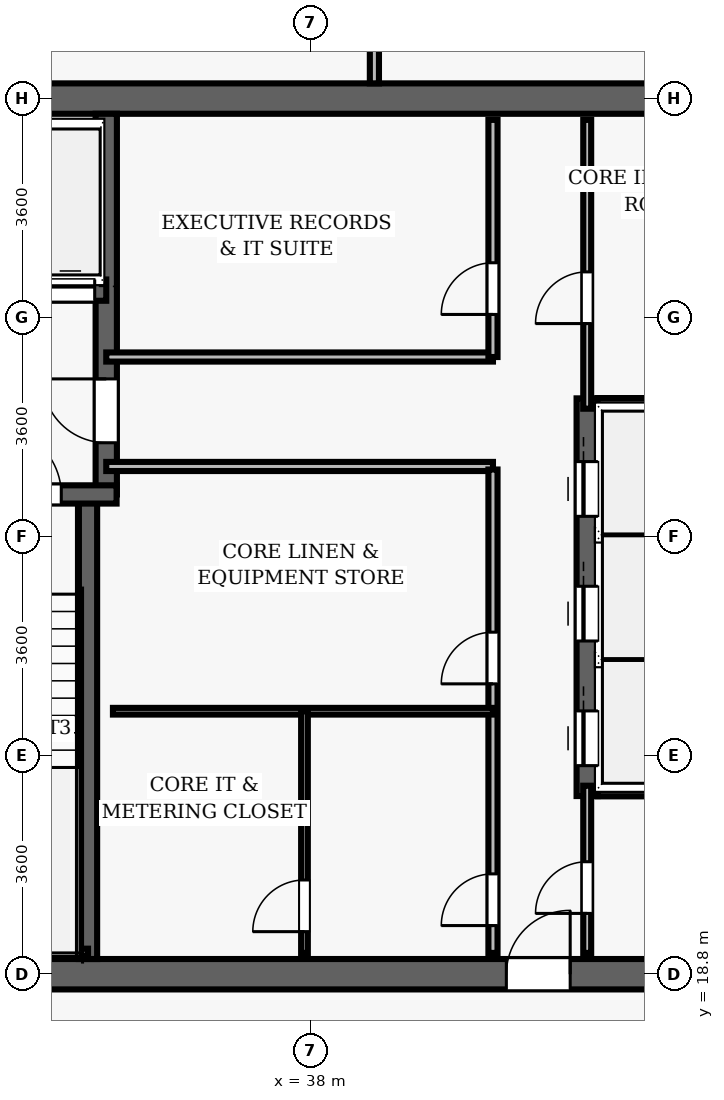
"""IFC4 building model, lengths in metres.
Left out: names, types, materials, properties, quantities, classifications, styles, units other than length and angle.
Written with IfcOpenShell. Run it as: python <this file> out.ifc"""

import sys

from ifc_helpers import new_model, si_unit, direction, frame, frame_2d, origin, place, context, subcontext, project, spatial, rectangle, extrude, element, fill, save


model = new_model("IFC4")
c1 = context("Model", 3, precision=1e-05, world=origin(), true_north=direction((0.0, 1.0)))
c2 = subcontext(c1, "Body", "Model", "MODEL_VIEW")
j1 = project(units=[si_unit("LENGTHUNIT", "METRE"), si_unit("PLANEANGLEUNIT", "RADIAN")], contexts=[c1])
p1 = place(None, origin())
s1 = spatial("IfcSite", under=j1, at=p1, CompositionType="ELEMENT")
p2 = place(p1, origin())
s2 = spatial("IfcBuilding", under=s1, at=p2, CompositionType="ELEMENT")
p3 = place(p2, frame((0.0, 0.0, 284.4)))
s3 = spatial("IfcBuildingStorey", under=s2, at=p3, CompositionType="ELEMENT", Elevation=284.4)
p4 = place(p3, frame((26.75, 18.8, 0.0), z_axis=(0.0, 0.0, 1.0), x_axis=(1.0, 0.0, 0.0)))
e1 = element("IfcWall", 1, at=p4, inside=s3, PredefinedType="SHEAR", context=c2, shape_type="SweptSolid", body=[
    extrude(rectangle(XDim=22.5, YDim=0.5, at=frame_2d((11.25, 0.0))), origin(), (0.0, 0.0, 1.0), 3.85),
])
p5 = place(p4, frame((14.47, 0.0, 0.0)))
e2 = element("IfcOpeningElement", 2, at=p5, cuts=e1, PredefinedType="OPENING", context=c2, shape_type="SweptSolid", body=[
    extrude(rectangle(XDim=1.05, YDim=2.15, at=frame_2d((0.525, 1.075))), frame((0.0, 0.26, 0.0), z_axis=(0.0, -1.0, 0.0), x_axis=(1.0, 0.0, 0.0)), (0.0, 0.0, 1.0), 0.52),
])
p6 = place(p3, frame((26.75, 33.2, 0.0), z_axis=(0.0, 0.0, 1.0), x_axis=(1.0, 0.0, 0.0)))
e3 = element("IfcWall", 3, at=p6, inside=s3, PredefinedType="SHEAR", context=c2, shape_type="SweptSolid", body=[
    extrude(rectangle(XDim=22.5, YDim=0.5, at=frame_2d((11.25, 0.0))), origin(), (0.0, 0.0, 1.0), 3.85),
])
p7 = place(p3, frame((34.34, 19.05, 0.0), z_axis=(0.0, 0.0, 1.0), x_axis=(0.0, 1.0, 0.0)))
e4 = element("IfcWall", 4, at=p7, inside=s3, PredefinedType="SHEAR", context=c2, shape_type="SweptSolid", body=[
    extrude(rectangle(XDim=7.5, YDim=0.3, at=frame_2d((3.75, 0.0))), origin(), (0.0, 0.0, 1.0), 3.85),
])
p8 = place(p3, frame((34.64, 26.69, 0.0), z_axis=(0.0, 0.0, 1.0), x_axis=(0.0, 1.0, 0.0)))
e5 = element("IfcWall", 5, at=p8, inside=s3, PredefinedType="SHEAR", context=c2, shape_type="SweptSolid", body=[
    extrude(rectangle(XDim=6.26, YDim=0.35, at=frame_2d((3.13, 0.0))), origin(), (0.0, 0.0, 1.0), 3.85),
])
p9 = place(p8, frame((0.85, 0.0, 0.0)))
e6 = element("IfcOpeningElement", 6, at=p9, cuts=e5, PredefinedType="OPENING", context=c2, shape_type="SweptSolid", body=[
    extrude(rectangle(XDim=1.05, YDim=2.15, at=frame_2d((0.525, 1.075))), frame((0.0, 0.185, 0.0), z_axis=(0.0, -1.0, 0.0), x_axis=(1.0, 0.0, 0.0)), (0.0, 0.0, 1.0), 0.37),
])
p10 = place(p3, frame((31.25, 26.69, 0.0), z_axis=(0.0, 0.0, 1.0), x_axis=(1.0, 0.0, 0.0)))
e7 = element("IfcWall", 7, at=p10, inside=s3, PredefinedType="SHEAR", context=c2, shape_type="SweptSolid", body=[
    extrude(rectangle(XDim=3.56, YDim=0.3, at=frame_2d((1.78, 0.0))), origin(), (0.0, 0.0, 1.0), 3.85),
])
p11 = place(p10, frame((1.55, 0.0, 0.0)))
e8 = element("IfcOpeningElement", 8, at=p11, cuts=e7, PredefinedType="OPENING", context=c2, shape_type="SweptSolid", body=[
    extrude(rectangle(XDim=1.1, YDim=2.15, at=frame_2d((0.55, 1.075))), frame((0.0, 0.16, 0.0), z_axis=(0.0, -1.0, 0.0), x_axis=(1.0, 0.0, 0.0)), (0.0, 0.0, 1.0), 0.32),
])
p12 = place(p3, frame((31.3, 19.16, 0.0), z_axis=(0.0, 0.0, 1.0), x_axis=(1.0, 0.0, 0.0)))
e9 = element("IfcWall", 9, at=p12, inside=s3, PredefinedType="SHEAR", context=c2, shape_type="SweptSolid", body=[
    extrude(rectangle(XDim=3.04, YDim=0.12, at=frame_2d((1.52, 0.0))), origin(), (0.0, 0.0, 1.0), 3.85),
])
p13 = place(p3, frame((32.23, 30.05, 0.0), z_axis=(0.0, 0.0, 1.0), x_axis=(1.0, 0.0, 0.0)))
e10 = element("IfcWall", 10, at=p13, inside=s3, PredefinedType="SHEAR", context=c2, shape_type="SweptSolid", body=[
    extrude(rectangle(XDim=2.41, YDim=0.35, at=frame_2d((1.205, 0.0))), origin(), (0.0, 0.0, 1.0), 3.04),
])
p14 = place(p13, frame((0.42, 0.0, 0.0)))
e11 = element("IfcOpeningElement", 11, at=p14, cuts=e10, PredefinedType="OPENING", context=c2, shape_type="SweptSolid", body=[
    extrude(rectangle(XDim=0.8, YDim=2.15, at=frame_2d((0.4, 1.075))), frame((0.0, 0.185, 0.0), z_axis=(0.0, -1.0, 0.0), x_axis=(1.0, 0.0, 0.0)), (0.0, 0.0, 1.0), 0.37),
])
p15 = place(p13, frame((1.42, 0.0, 0.0)))
e12 = element("IfcOpeningElement", 12, at=p15, cuts=e10, PredefinedType="OPENING", context=c2, shape_type="SweptSolid", body=[
    extrude(rectangle(XDim=0.8, YDim=2.15, at=frame_2d((0.4, 1.075))), frame((0.0, 0.185, 0.0), z_axis=(0.0, -1.0, 0.0), x_axis=(1.0, 0.0, 0.0)), (0.0, 0.0, 1.0), 0.37),
])
p16 = place(p3, frame((42.55, 21.73, 0.0), z_axis=(0.0, 0.0, 1.0), x_axis=(0.0, 1.0, 0.0)))
e13 = element("IfcWall", 13, at=p16, inside=s3, PredefinedType="SHEAR", context=c2, shape_type="SweptSolid", body=[
    extrude(rectangle(XDim=6.54, YDim=0.35, at=frame_2d((3.27, 0.0))), origin(), (0.0, 0.0, 1.0), 3.04),
])
p17 = place(p16, frame((0.5, 0.0, 0.0)))
e14 = element("IfcOpeningElement", 14, at=p17, cuts=e13, PredefinedType="OPENING", context=c2, shape_type="SweptSolid", body=[
    extrude(rectangle(XDim=0.9, YDim=2.15, at=frame_2d((0.45, 1.075))), frame((0.0, 0.185, 0.0), z_axis=(0.0, -1.0, 0.0), x_axis=(1.0, 0.0, 0.0)), (0.0, 0.0, 1.0), 0.37),
])
p18 = place(p16, frame((2.55, 0.0, 0.0)))
e15 = element("IfcOpeningElement", 15, at=p18, cuts=e13, PredefinedType="OPENING", context=c2, shape_type="SweptSolid", body=[
    extrude(rectangle(XDim=0.9, YDim=2.15, at=frame_2d((0.45, 1.075))), frame((0.0, 0.185, 0.0), z_axis=(0.0, -1.0, 0.0), x_axis=(1.0, 0.0, 0.0)), (0.0, 0.0, 1.0), 0.37),
])
p19 = place(p16, frame((4.6, 0.0, 0.0)))
e16 = element("IfcOpeningElement", 16, at=p19, cuts=e13, PredefinedType="OPENING", context=c2, shape_type="SweptSolid", body=[
    extrude(rectangle(XDim=0.9, YDim=2.15, at=frame_2d((0.45, 1.075))), frame((0.0, 0.185, 0.0), z_axis=(0.0, -1.0, 0.0), x_axis=(1.0, 0.0, 0.0)), (0.0, 0.0, 1.0), 0.37),
])
for number, where, z_axis, x_axis in (
    (17, (42.72, 21.9, 0.0), (0.0, 0.0, 1.0), (1.0, 0.0, 0.0)),
    (18, (42.72, 28.1, 0.0), (0.0, 0.0, 1.0), (1.0, 0.0, 0.0)),
):
    element("IfcWall", number, at=place(p3, frame(where, z_axis=z_axis, x_axis=x_axis)), inside=s3, PredefinedType="SHEAR", context=c2, shape_type="SweptSolid", body=[
        extrude(rectangle(XDim=2.03, YDim=0.35, at=frame_2d((1.015, 0.0))), origin(), (0.0, 0.0, 1.0), 3.04),
    ])
for number, where, z_axis, x_axis in (
    (19, (34.64, 27.15, 0.0), (0.0, 0.0, 1.0), (1.0, 0.0, 0.0)),
    (20, (34.64, 28.95, 0.0), (0.0, 0.0, 1.0), (1.0, 0.0, 0.0)),
):
    element("IfcWall", number, at=place(p3, frame(where, z_axis=z_axis, x_axis=x_axis)), inside=s3, PredefinedType="PARTITIONING", context=c2, shape_type="SweptSolid", body=[
        extrude(rectangle(XDim=6.36, YDim=0.15, at=frame_2d((3.18, 0.0))), origin(), (0.0, 0.0, 1.0), 3.04),
    ])
p20 = place(p3, frame((41.0, 28.95, 0.0), z_axis=(0.0, 0.0, 1.0), x_axis=(0.0, 1.0, 0.0)))
e21 = element("IfcWall", 21, at=p20, inside=s3, PredefinedType="PARTITIONING", context=c2, shape_type="SweptSolid", body=[
    extrude(rectangle(XDim=3.9, YDim=0.15, at=frame_2d((1.95, 0.0))), origin(), (0.0, 0.0, 1.0), 3.04),
])
p21 = place(p20, frame((0.7, 0.0, 0.0)))
e22 = element("IfcOpeningElement", 22, at=p21, cuts=e21, PredefinedType="OPENING", context=c2, shape_type="SweptSolid", body=[
    extrude(rectangle(XDim=0.85, YDim=2.1, at=frame_2d((0.425, 1.05))), frame((0.0, 0.085, 0.0), z_axis=(0.0, -1.0, 0.0), x_axis=(1.0, 0.0, 0.0)), (0.0, 0.0, 1.0), 0.17),
])
p22 = place(p3, frame((41.0, 19.15, 0.0), z_axis=(0.0, 0.0, 1.0), x_axis=(0.0, 1.0, 0.0)))
e23 = element("IfcWall", 23, at=p22, inside=s3, PredefinedType="PARTITIONING", context=c2, shape_type="SweptSolid", body=[
    extrude(rectangle(XDim=7.95, YDim=0.15, at=frame_2d((3.975, 0.0))), origin(), (0.0, 0.0, 1.0), 3.04),
])
p23 = place(p22, frame((4.425, 0.0, 0.0)))
e24 = element("IfcOpeningElement", 24, at=p23, cuts=e23, PredefinedType="OPENING", context=c2, shape_type="SweptSolid", body=[
    extrude(rectangle(XDim=0.85, YDim=2.1, at=frame_2d((0.425, 1.05))), frame((0.0, 0.085, 0.0), z_axis=(0.0, -1.0, 0.0), x_axis=(1.0, 0.0, 0.0)), (0.0, 0.0, 1.0), 0.17),
])
p24 = place(p22, frame((0.45, 0.0, 0.0)))
e25 = element("IfcOpeningElement", 25, at=p24, cuts=e23, PredefinedType="OPENING", context=c2, shape_type="SweptSolid", body=[
    extrude(rectangle(XDim=0.85, YDim=2.1, at=frame_2d((0.425, 1.05))), frame((0.0, 0.085, 0.0), z_axis=(0.0, -1.0, 0.0), x_axis=(1.0, 0.0, 0.0)), (0.0, 0.0, 1.0), 0.17),
])
p25 = place(p3, frame((34.75, 23.125, 0.0), z_axis=(0.0, 0.0, 1.0), x_axis=(1.0, 0.0, 0.0)))
e26 = element("IfcWall", 26, at=p25, inside=s3, PredefinedType="PARTITIONING", context=c2, shape_type="SweptSolid", body=[
    extrude(rectangle(XDim=6.25, YDim=0.11, at=frame_2d((3.125, 0.0))), origin(), (0.0, 0.0, 1.0), 3.04),
])
p26 = place(p3, frame((37.9, 19.15, 0.0), z_axis=(0.0, 0.0, 1.0), x_axis=(0.0, 1.0, 0.0)))
e27 = element("IfcWall", 27, at=p26, inside=s3, PredefinedType="PARTITIONING", context=c2, shape_type="SweptSolid", body=[
    extrude(rectangle(XDim=3.975, YDim=0.11, at=frame_2d((1.988, 0.0))), origin(), (0.0, 0.0, 1.0), 3.04),
])
p27 = place(p26, frame((0.35, 0.0, 0.0)))
e28 = element("IfcOpeningElement", 28, at=p27, cuts=e27, PredefinedType="OPENING", context=c2, shape_type="SweptSolid", body=[
    extrude(rectangle(XDim=0.85, YDim=2.1, at=frame_2d((0.425, 1.05))), frame((0.0, 0.065, 0.0), z_axis=(0.0, -1.0, 0.0), x_axis=(1.0, 0.0, 0.0)), (0.0, 0.0, 1.0), 0.13),
])
p28 = place(p3, frame((42.55, 28.1, 0.0), z_axis=(0.0, 0.0, 1.0), x_axis=(0.0, 1.0, 0.0)))
e29 = element("IfcWall", 29, at=p28, inside=s3, PredefinedType="PARTITIONING", context=c2, shape_type="SweptSolid", body=[
    extrude(rectangle(XDim=4.75, YDim=0.13, at=frame_2d((2.375, 0.0))), origin(), (0.0, 0.0, 1.0), 3.04),
])
p29 = place(p28, frame((1.4, 0.0, 0.0)))
e30 = element("IfcOpeningElement", 30, at=p29, cuts=e29, PredefinedType="OPENING", context=c2, shape_type="SweptSolid", body=[
    extrude(rectangle(XDim=0.85, YDim=2.1, at=frame_2d((0.425, 1.05))), frame((0.0, 0.075, 0.0), z_axis=(0.0, -1.0, 0.0), x_axis=(1.0, 0.0, 0.0)), (0.0, 0.0, 1.0), 0.15),
])
p30 = place(p3, frame((42.55, 19.15, 0.0), z_axis=(0.0, 0.0, 1.0), x_axis=(0.0, 1.0, 0.0)))
e31 = element("IfcWall", 31, at=p30, inside=s3, PredefinedType="PARTITIONING", context=c2, shape_type="SweptSolid", body=[
    extrude(rectangle(XDim=2.75, YDim=0.13, at=frame_2d((1.375, 0.0))), origin(), (0.0, 0.0, 1.0), 3.04),
])
p31 = place(p30, frame((0.65, 0.0, 0.0)))
e32 = element("IfcOpeningElement", 32, at=p31, cuts=e31, PredefinedType="OPENING", context=c2, shape_type="SweptSolid", body=[
    extrude(rectangle(XDim=0.85, YDim=2.1, at=frame_2d((0.425, 1.05))), frame((0.0, 0.075, 0.0), z_axis=(0.0, -1.0, 0.0), x_axis=(1.0, 0.0, 0.0)), (0.0, 0.0, 1.0), 0.15),
])
p32 = place(p3, frame((39.05, 33.45, 0.0), z_axis=(0.0, 0.0, 1.0), x_axis=(0.0, 1.0, 0.0)))
e33 = element("IfcWall", 33, at=p32, inside=s3, PredefinedType="PARTITIONING", context=c2, shape_type="SweptSolid", body=[
    extrude(rectangle(XDim=6.95, YDim=0.15, at=frame_2d((3.475, 0.0))), origin(), (0.0, 0.0, 1.0), 3.04),
])
p33 = place(p32, frame((0.988, 0.0, 0.0)))
e34 = element("IfcOpeningElement", 34, at=p33, cuts=e33, PredefinedType="OPENING", context=c2, shape_type="SweptSolid", body=[
    extrude(rectangle(XDim=1.5, YDim=2.2, at=frame_2d((0.75, 1.1))), frame((0.0, 0.085, 0.0), z_axis=(0.0, -1.0, 0.0), x_axis=(1.0, 0.0, 0.0)), (0.0, 0.0, 1.0), 0.17),
])
p34 = place(p11, origin())
e35 = element("IfcDoor", 35, at=p34, inside=s3, OperationType="SINGLE_SWING_LEFT", PredefinedType="DOOR", context=c2, shape_type="SweptSolid", body=[
    extrude(rectangle(XDim=1.1, YDim=2.15, at=frame_2d((0.55, 1.075))), frame((0.0, 0.025, 0.0), z_axis=(0.0, -1.0, 0.0), x_axis=(1.0, 0.0, 0.0)), (0.0, 0.0, 1.0), 0.05),
])
fill(e8, e35)
p35 = place(p5, origin())
e36 = element("IfcDoor", 36, at=p35, inside=s3, OperationType="SINGLE_SWING_RIGHT", PredefinedType="DOOR", context=c2, shape_type="SweptSolid", body=[
    extrude(rectangle(XDim=1.05, YDim=2.15, at=frame_2d((0.525, 1.075))), frame((0.0, 0.025, 0.0), z_axis=(0.0, -1.0, 0.0), x_axis=(1.0, 0.0, 0.0)), (0.0, 0.0, 1.0), 0.05),
])
fill(e2, e36)
p36 = place(p9, origin())
e37 = element("IfcDoor", 37, at=p36, inside=s3, OperationType="SINGLE_SWING_RIGHT", PredefinedType="DOOR", context=c2, shape_type="SweptSolid", body=[
    extrude(rectangle(XDim=1.05, YDim=2.15, at=frame_2d((0.525, 1.075))), frame((0.0, 0.025, 0.0), z_axis=(0.0, -1.0, 0.0), x_axis=(1.0, 0.0, 0.0)), (0.0, 0.0, 1.0), 0.05),
])
fill(e6, e37)
p37 = place(p21, origin())
e38 = element("IfcDoor", 38, at=p37, inside=s3, OperationType="SINGLE_SWING_LEFT", PredefinedType="DOOR", context=c2, shape_type="SweptSolid", body=[
    extrude(rectangle(XDim=0.85, YDim=2.1, at=frame_2d((0.425, 1.05))), frame((0.0, 0.025, 0.0), z_axis=(0.0, -1.0, 0.0), x_axis=(1.0, 0.0, 0.0)), (0.0, 0.0, 1.0), 0.05),
])
fill(e22, e38)
p38 = place(p23, origin())
e39 = element("IfcDoor", 39, at=p38, inside=s3, OperationType="SINGLE_SWING_LEFT", PredefinedType="DOOR", context=c2, shape_type="SweptSolid", body=[
    extrude(rectangle(XDim=0.85, YDim=2.1, at=frame_2d((0.425, 1.05))), frame((0.0, 0.025, 0.0), z_axis=(0.0, -1.0, 0.0), x_axis=(1.0, 0.0, 0.0)), (0.0, 0.0, 1.0), 0.05),
])
fill(e24, e39)
p39 = place(p24, origin())
e40 = element("IfcDoor", 40, at=p39, inside=s3, OperationType="SINGLE_SWING_LEFT", PredefinedType="DOOR", context=c2, shape_type="SweptSolid", body=[
    extrude(rectangle(XDim=0.85, YDim=2.1, at=frame_2d((0.425, 1.05))), frame((0.0, 0.025, 0.0), z_axis=(0.0, -1.0, 0.0), x_axis=(1.0, 0.0, 0.0)), (0.0, 0.0, 1.0), 0.05),
])
fill(e25, e40)
p40 = place(p27, origin())
e41 = element("IfcDoor", 41, at=p40, inside=s3, OperationType="SINGLE_SWING_LEFT", PredefinedType="DOOR", context=c2, shape_type="SweptSolid", body=[
    extrude(rectangle(XDim=0.85, YDim=2.1, at=frame_2d((0.425, 1.05))), frame((0.0, 0.025, 0.0), z_axis=(0.0, -1.0, 0.0), x_axis=(1.0, 0.0, 0.0)), (0.0, 0.0, 1.0), 0.05),
])
fill(e28, e41)
p41 = place(p29, origin())
e42 = element("IfcDoor", 42, at=p41, inside=s3, OperationType="SINGLE_SWING_LEFT", PredefinedType="DOOR", context=c2, shape_type="SweptSolid", body=[
    extrude(rectangle(XDim=0.85, YDim=2.1, at=frame_2d((0.425, 1.05))), frame((0.0, 0.025, 0.0), z_axis=(0.0, -1.0, 0.0), x_axis=(1.0, 0.0, 0.0)), (0.0, 0.0, 1.0), 0.05),
])
fill(e30, e42)
p42 = place(p31, origin())
e43 = element("IfcDoor", 43, at=p42, inside=s3, OperationType="SINGLE_SWING_LEFT", PredefinedType="DOOR", context=c2, shape_type="SweptSolid", body=[
    extrude(rectangle(XDim=0.85, YDim=2.1, at=frame_2d((0.425, 1.05))), frame((0.0, 0.025, 0.0), z_axis=(0.0, -1.0, 0.0), x_axis=(1.0, 0.0, 0.0)), (0.0, 0.0, 1.0), 0.05),
])
fill(e32, e43)
p43 = place(p17, origin())
e44 = element("IfcDoor", 44, at=p43, inside=s3, OperationType="SLIDING_TO_LEFT", PredefinedType="DOOR", context=c2, shape_type="SweptSolid", body=[
    extrude(rectangle(XDim=0.9, YDim=2.15, at=frame_2d((0.45, 1.075))), frame((0.0, 0.025, 0.0), z_axis=(0.0, -1.0, 0.0), x_axis=(1.0, 0.0, 0.0)), (0.0, 0.0, 1.0), 0.05),
])
fill(e14, e44)
p44 = place(p18, origin())
e45 = element("IfcDoor", 45, at=p44, inside=s3, OperationType="SLIDING_TO_LEFT", PredefinedType="DOOR", context=c2, shape_type="SweptSolid", body=[
    extrude(rectangle(XDim=0.9, YDim=2.15, at=frame_2d((0.45, 1.075))), frame((0.0, 0.025, 0.0), z_axis=(0.0, -1.0, 0.0), x_axis=(1.0, 0.0, 0.0)), (0.0, 0.0, 1.0), 0.05),
])
fill(e15, e45)
p45 = place(p19, origin())
e46 = element("IfcDoor", 46, at=p45, inside=s3, OperationType="SLIDING_TO_LEFT", PredefinedType="DOOR", context=c2, shape_type="SweptSolid", body=[
    extrude(rectangle(XDim=0.9, YDim=2.15, at=frame_2d((0.45, 1.075))), frame((0.0, 0.025, 0.0), z_axis=(0.0, -1.0, 0.0), x_axis=(1.0, 0.0, 0.0)), (0.0, 0.0, 1.0), 0.05),
])
fill(e16, e46)
p46 = place(p15, origin())
e47 = element("IfcDoor", 47, at=p46, inside=s3, OperationType="SLIDING_TO_LEFT", PredefinedType="DOOR", context=c2, shape_type="SweptSolid", body=[
    extrude(rectangle(XDim=0.8, YDim=2.15, at=frame_2d((0.4, 1.075))), frame((0.0, 0.025, 0.0), z_axis=(0.0, -1.0, 0.0), x_axis=(1.0, 0.0, 0.0)), (0.0, 0.0, 1.0), 0.05),
])
fill(e12, e47)
save(model, sys.argv[1])
